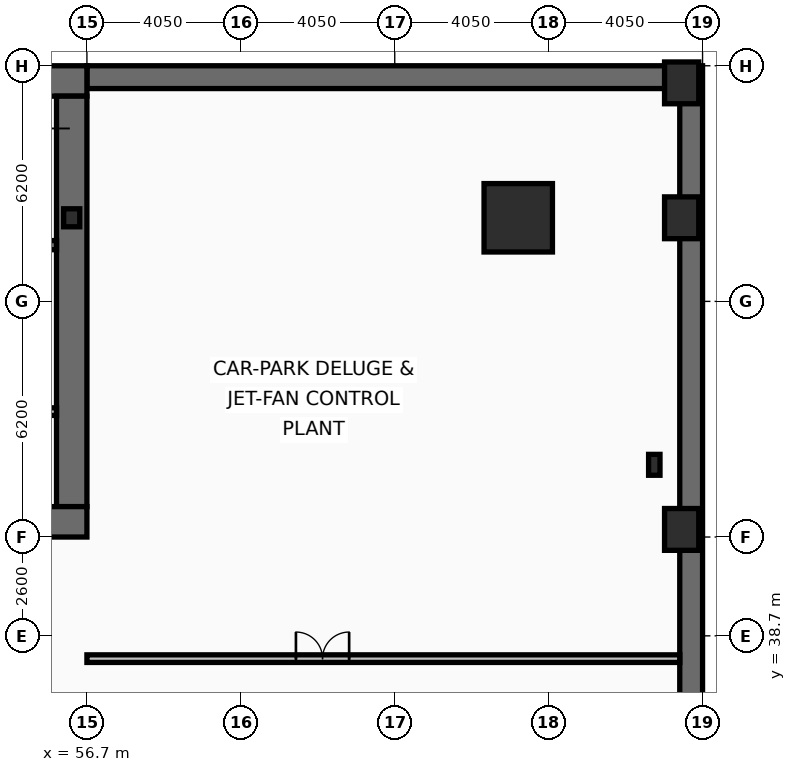
"""IFC4 building model, lengths in metres.
Left out: names, types, materials, properties, quantities, classifications, styles, units other than length and angle.
Written with IfcOpenShell. Run it as: python <this file> out.ifc"""

import sys

from ifc_helpers import new_model, si_unit, direction, frame, frame_2d, origin, origin_2d, place, context, subcontext, project, spatial, rectangle, hollow_rectangle, i_section, extrude, element, fill, save


model = new_model("IFC4")
c1 = context("Model", 3, precision=1e-05, world=origin(), true_north=direction((0.0, 1.0)))
c2 = subcontext(c1, "Body", "Model", "MODEL_VIEW")
j1 = project(units=[si_unit("LENGTHUNIT", "METRE"), si_unit("PLANEANGLEUNIT", "RADIAN")], contexts=[c1])
p1 = place(None, origin())
s1 = spatial("IfcSite", under=j1, at=p1, CompositionType="ELEMENT")
p2 = place(p1, origin())
s2 = spatial("IfcBuilding", under=s1, at=p2, CompositionType="ELEMENT")
p3 = place(p2, frame((0.0, 0.0, -4.5)))
s3 = spatial("IfcBuildingStorey", under=s2, at=p3, CompositionType="ELEMENT", Elevation=-4.5)
p4 = place(p3, frame((56.7, 53.4, 0.0), z_axis=(0.0, 0.0, 1.0), x_axis=(1.0, 0.0, 0.0)))
e1 = element("IfcWall", 1, at=p4, inside=s3, PredefinedType="SOLIDWALL", context=c2, shape_type="SweptSolid", body=[
    extrude(rectangle(XDim=15.6, YDim=0.6, at=frame_2d((7.8, 0.0))), origin(), (0.0, 0.0, 1.0), 4.28),
])
p5 = place(p3, frame((72.6, 53.7, 0.0), z_axis=(0.0, 0.0, 1.0), x_axis=(0.0, -1.0, 0.0)))
e2 = element("IfcWall", 2, at=p5, inside=s3, PredefinedType="SOLIDWALL", context=c2, shape_type="SweptSolid", body=[
    extrude(rectangle(XDim=53.7, YDim=0.6, at=frame_2d((26.85, 0.0))), origin(), (0.0, 0.0, 1.0), 4.28),
])
p6 = place(p3, frame((16.2, 53.3, 0.0), z_axis=(0.0, 0.0, 1.0), x_axis=(1.0, 0.0, 0.0)))
e3 = element("IfcWall", 3, at=p6, inside=s3, PredefinedType="SHEAR", context=c2, shape_type="SweptSolid", body=[
    extrude(rectangle(XDim=40.5, YDim=0.8, at=frame_2d((20.25, 0.0))), origin(), (0.0, 0.0, 1.0), 4.28),
])
p7 = place(p3, frame((56.3, 52.9, 0.0), z_axis=(0.0, 0.0, 1.0), x_axis=(0.0, -1.0, 0.0)))
e4 = element("IfcWall", 4, at=p7, inside=s3, PredefinedType="SHEAR", context=c2, shape_type="SweptSolid", body=[
    extrude(rectangle(XDim=10.8, YDim=0.8, at=frame_2d((5.4, 0.0))), origin(), (0.0, 0.0, 1.0), 4.28),
])
p8 = place(p3, frame((56.7, 41.7, 0.0), z_axis=(0.0, 0.0, 1.0), x_axis=(-1.0, 0.0, 0.0)))
e5 = element("IfcWall", 5, at=p8, inside=s3, PredefinedType="SHEAR", context=c2, shape_type="SweptSolid", body=[
    extrude(rectangle(XDim=2.45, YDim=0.8, at=frame_2d((1.225, 0.0))), origin(), (0.0, 0.0, 1.0), 4.28),
])
p9 = place(p3, frame((48.63, 48.98, 0.0), z_axis=(0.0, 0.0, 1.0), x_axis=(1.0, 0.0, 0.0)))
e6 = element("IfcWall", 6, at=p9, inside=s3, PredefinedType="SHEAR", context=c2, shape_type="SweptSolid", body=[
    extrude(rectangle(XDim=7.27, YDim=0.24, at=frame_2d((3.635, 0.0))), origin(), (0.0, 0.0, 1.0), 4.28),
])
p10 = place(p9, frame((6.0, 0.0, 0.0)))
e7 = element("IfcOpeningElement", 7, at=p10, cuts=e6, PredefinedType="OPENING", context=c2, shape_type="SweptSolid", body=[
    extrude(rectangle(XDim=1.05, YDim=2.15, at=frame_2d((0.525, 1.075))), frame((0.0, 0.13, 0.0), z_axis=(0.0, -1.0, 0.0), x_axis=(1.0, 0.0, 0.0)), (0.0, 0.0, 1.0), 0.26),
])
p11 = place(p3, frame((68.05, 49.7, 0.0), z_axis=(0.0, 0.0, 1.0), x_axis=(1.0, 0.0, 0.0)))
e8 = element("IfcColumn", 8, at=p11, inside=s3, PredefinedType="COLUMN", context=c2, shape_type="SweptSolid", body=[
    extrude(hollow_rectangle(XDim=1.8, YDim=1.8, WallThickness=0.08, at=origin_2d()), origin(), (0.0, 0.0, 1.0), 4.5),
])
p12 = place(p3, frame((71.63, 43.2, 0.0), z_axis=(0.0, 0.0, 1.0), x_axis=(1.0, 0.0, 0.0)))
e9 = element("IfcColumn", 9, at=p12, inside=s3, PredefinedType="COLUMN", context=c2, shape_type="SweptSolid", body=[
    extrude(i_section(OverallWidth=0.3, OverallDepth=0.55, WebThickness=0.015, FlangeThickness=0.029, at=origin_2d()), origin(), (0.0, 0.0, 1.0), 4.5),
])
p13 = place(p3, frame((56.3, 49.7, 0.0), z_axis=(0.0, 0.0, 1.0), x_axis=(1.0, 0.0, 0.0)))
e10 = element("IfcColumn", 10, at=p13, inside=s3, PredefinedType="COLUMN", context=c2, shape_type="SweptSolid", body=[
    extrude(i_section(OverallWidth=0.424, OverallDepth=0.474, WebThickness=0.048, FlangeThickness=0.077, at=origin_2d()), origin(), (0.0, 0.0, 1.0), 4.5),
])
for number, where, z_axis, x_axis in (
    (11, (72.35, 49.7, 0.0), (0.0, 0.0, 1.0), (1.0, 0.0, 0.0)),
    (12, (72.35, 53.25, 0.0), (0.0, 0.0, 1.0), (1.0, 0.0, 0.0)),
    (13, (72.35, 41.5, 0.0), (0.0, 0.0, 1.0), (1.0, 0.0, 0.0)),
):
    element("IfcColumn", number, at=place(p3, frame(where, z_axis=z_axis, x_axis=x_axis)), inside=s3, PredefinedType="PILASTER", context=c2, shape_type="SweptSolid", body=[
        extrude(rectangle(XDim=0.9, YDim=1.1, at=origin_2d()), origin(), (0.0, 0.0, 1.0), 4.5),
    ])
p14 = place(p3, frame((51.9, 44.6, 0.0), z_axis=(0.0, 0.0, 1.0), x_axis=(1.0, 0.0, 0.0)))
e14 = element("IfcWall", 14, at=p14, inside=s3, PredefinedType="PARTITIONING", context=c2, shape_type="SweptSolid", body=[
    extrude(rectangle(XDim=4.0, YDim=0.2, at=frame_2d((2.0, 0.0))), origin(), (0.0, 0.0, 1.0), 4.28),
])
p15 = place(p14, frame((1.15, 0.0, 0.0)))
e15 = element("IfcOpeningElement", 15, at=p15, cuts=e14, PredefinedType="OPENING", context=c2, shape_type="SweptSolid", body=[
    extrude(rectangle(XDim=1.05, YDim=2.15, at=frame_2d((0.525, 1.075))), frame((0.0, 0.11, 0.0), z_axis=(0.0, -1.0, 0.0), x_axis=(1.0, 0.0, 0.0)), (0.0, 0.0, 1.0), 0.22),
])
p16 = place(p3, frame((56.7, 38.1, 0.0), z_axis=(0.0, 0.0, 1.0), x_axis=(1.0, 0.0, 0.0)))
e16 = element("IfcWall", 16, at=p16, inside=s3, PredefinedType="PARTITIONING", context=c2, shape_type="SweptSolid", body=[
    extrude(rectangle(XDim=15.6, YDim=0.2, at=frame_2d((7.8, 0.0))), origin(), (0.0, 0.0, 1.0), 3.59),
])
p17 = place(p16, frame((5.5, 0.0, 0.0)))
e17 = element("IfcOpeningElement", 17, at=p17, cuts=e16, PredefinedType="OPENING", context=c2, shape_type="SweptSolid", body=[
    extrude(rectangle(XDim=1.4, YDim=2.15, at=frame_2d((0.7, 1.075))), frame((0.0, 0.11, 0.0), z_axis=(0.0, -1.0, 0.0), x_axis=(1.0, 0.0, 0.0)), (0.0, 0.0, 1.0), 0.22),
])
p18 = place(p17, origin())
e18 = element("IfcDoor", 18, at=p18, inside=s3, OperationType="DOUBLE_DOOR_SINGLE_SWING", PredefinedType="DOOR", context=c2, shape_type="SweptSolid", body=[
    extrude(rectangle(XDim=1.4, YDim=2.15, at=frame_2d((0.7, 1.075))), frame((0.0, 0.025, 0.0), z_axis=(0.0, -1.0, 0.0), x_axis=(1.0, 0.0, 0.0)), (0.0, 0.0, 1.0), 0.05),
])
fill(e17, e18)
save(model, sys.argv[1])
